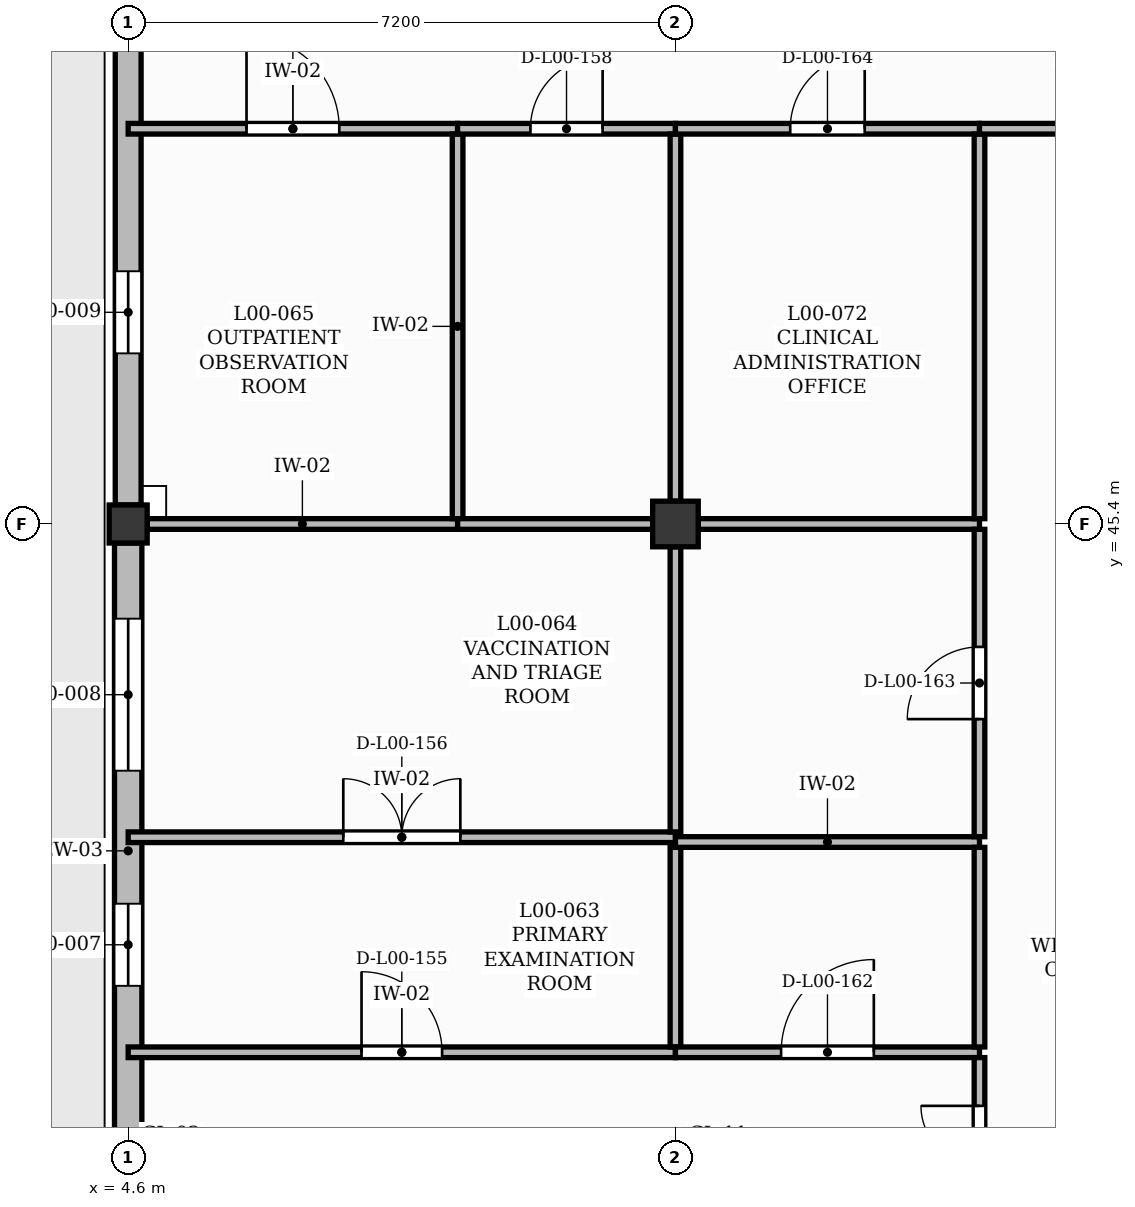
"""IFC4 building model, lengths in metres.
Left out: names, types, materials, properties, quantities, classifications, styles, units other than length and angle.
Written with IfcOpenShell. Run it as: python <this file> out.ifc"""

import sys

from ifc_helpers import new_model, si_unit, direction, frame, frame_2d, origin, origin_2d, place, context, subcontext, project, spatial, rectangle, extrude, element, fill, save


model = new_model("IFC4")
c1 = context("Model", 3, precision=1e-05, world=origin(), true_north=direction((0.0, 1.0)))
c2 = subcontext(c1, "Body", "Model", "MODEL_VIEW")
j1 = project(units=[si_unit("LENGTHUNIT", "METRE"), si_unit("PLANEANGLEUNIT", "RADIAN")], contexts=[c1])
p1 = place(None, origin())
s1 = spatial("IfcSite", under=j1, at=p1, CompositionType="ELEMENT")
p2 = place(p1, origin())
s2 = spatial("IfcBuilding", under=s1, at=p2, CompositionType="ELEMENT")
p3 = place(p2, origin())
s3 = spatial("IfcBuildingStorey", under=s2, at=p3, CompositionType="ELEMENT", Elevation=0.0)
p4 = place(p3, frame((4.6, 45.4, 0.0), z_axis=(0.0, 0.0, 1.0), x_axis=(1.0, 0.0, 0.0)))
e1 = element("IfcColumn", 1, at=p4, inside=s3, PredefinedType="COLUMN", context=c2, shape_type="SweptSolid", body=[
    extrude(rectangle(XDim=0.5, YDim=0.5, at=origin_2d()), origin(), (0.0, 0.0, 1.0), 4.2),
])
p5 = place(p3, frame((11.8, 45.4, 0.0), z_axis=(0.0, 0.0, 1.0), x_axis=(1.0, 0.0, 0.0)))
e2 = element("IfcColumn", 2, at=p5, inside=s3, PredefinedType="COLUMN", context=c2, shape_type="SweptSolid", body=[
    extrude(rectangle(XDim=0.6, YDim=0.6, at=origin_2d()), origin(), (0.0, 0.0, 1.0), 4.2),
])
p6 = place(p3, frame((4.6, 37.05, 0.0), z_axis=(0.0, 0.0, 1.0), x_axis=(0.0, 1.0, 0.0)))
e3 = element("IfcWall", 3, at=p6, inside=s3, PredefinedType="SOLIDWALL", context=c2, shape_type="SweptSolid", body=[
    extrude(rectangle(XDim=8.1, YDim=0.36, at=frame_2d((4.05, 0.0))), origin(), (0.0, 0.0, 1.0), 3.68),
])
p7 = place(p6, frame((2.274, 0.0, 1.0)))
e4 = element("IfcOpeningElement", 4, at=p7, cuts=e3, PredefinedType="OPENING", context=c2, shape_type="SweptSolid", body=[
    extrude(rectangle(XDim=1.08, YDim=1.95, at=frame_2d((0.54, 0.975))), frame((0.0, 0.19, 0.0), z_axis=(0.0, -1.0, 0.0), x_axis=(1.0, 0.0, 0.0)), (0.0, 0.0, 1.0), 0.38),
])
p8 = place(p6, frame((5.104, 0.0, 1.0)))
e5 = element("IfcOpeningElement", 5, at=p8, cuts=e3, PredefinedType="OPENING", context=c2, shape_type="SweptSolid", body=[
    extrude(rectangle(XDim=2.0, YDim=2.2, at=frame_2d((1.0, 1.1))), frame((0.0, 0.19, 0.0), z_axis=(0.0, -1.0, 0.0), x_axis=(1.0, 0.0, 0.0)), (0.0, 0.0, 1.0), 0.38),
])
p9 = place(p3, frame((4.6, 45.65, 0.0), z_axis=(0.0, 0.0, 1.0), x_axis=(0.0, 1.0, 0.0)))
e6 = element("IfcWall", 6, at=p9, inside=s3, PredefinedType="SOLIDWALL", context=c2, shape_type="SweptSolid", body=[
    extrude(rectangle(XDim=6.65, YDim=0.34, at=frame_2d((3.325, 0.0))), origin(), (0.0, 0.0, 1.0), 3.68),
])
p10 = place(p9, frame((1.995, 0.0, 1.0)))
e7 = element("IfcOpeningElement", 7, at=p10, cuts=e6, PredefinedType="OPENING", context=c2, shape_type="SweptSolid", body=[
    extrude(rectangle(XDim=1.08, YDim=1.95, at=frame_2d((0.54, 0.975))), frame((0.0, 0.18, 0.0), z_axis=(0.0, -1.0, 0.0), x_axis=(1.0, 0.0, 0.0)), (0.0, 0.0, 1.0), 0.36),
])
p11 = place(p3, frame((4.6, 38.45, 0.0), z_axis=(0.0, 0.0, 1.0), x_axis=(1.0, 0.0, 0.0)))
e8 = element("IfcWall", 8, at=p11, inside=s3, PredefinedType="PARTITIONING", context=c2, shape_type="SweptSolid", body=[
    extrude(rectangle(XDim=7.2, YDim=0.14, at=frame_2d((3.6, 0.0))), origin(), (0.0, 0.0, 1.0), 4.18),
])
p12 = place(p11, frame((3.07, 0.0, 0.0)))
e9 = element("IfcOpeningElement", 9, at=p12, cuts=e8, PredefinedType="OPENING", context=c2, shape_type="SweptSolid", body=[
    extrude(rectangle(XDim=1.06, YDim=2.15, at=frame_2d((0.53, 1.075))), frame((0.0, 0.08, 0.0), z_axis=(0.0, -1.0, 0.0), x_axis=(1.0, 0.0, 0.0)), (0.0, 0.0, 1.0), 0.16),
])
p13 = place(p3, frame((4.6, 41.279, 0.0), z_axis=(0.0, 0.0, 1.0), x_axis=(1.0, 0.0, 0.0)))
e10 = element("IfcWall", 10, at=p13, inside=s3, PredefinedType="PARTITIONING", context=c2, shape_type="SweptSolid", body=[
    extrude(rectangle(XDim=7.2, YDim=0.14, at=frame_2d((3.6, 0.0))), origin(), (0.0, 0.0, 1.0), 4.18),
])
p14 = place(p13, frame((2.83, 0.0, 0.0)))
e11 = element("IfcOpeningElement", 11, at=p14, cuts=e10, PredefinedType="OPENING", context=c2, shape_type="SweptSolid", body=[
    extrude(rectangle(XDim=1.54, YDim=2.25, at=frame_2d((0.77, 1.125))), frame((0.0, 0.08, 0.0), z_axis=(0.0, -1.0, 0.0), x_axis=(1.0, 0.0, 0.0)), (0.0, 0.0, 1.0), 0.16),
])
p15 = place(p3, frame((4.85, 45.4, 0.0), z_axis=(0.0, 0.0, 1.0), x_axis=(1.0, 0.0, 0.0)))
e12 = element("IfcWall", 12, at=p15, inside=s3, PredefinedType="PARTITIONING", context=c2, shape_type="SweptSolid", body=[
    extrude(rectangle(XDim=4.084, YDim=0.14, at=frame_2d((2.042, 0.0))), origin(), (0.0, 0.0, 1.0), 3.25),
])
p16 = place(p3, frame((4.6, 50.6, 0.0), z_axis=(0.0, 0.0, 1.0), x_axis=(1.0, 0.0, 0.0)))
e13 = element("IfcWall", 13, at=p16, inside=s3, PredefinedType="PARTITIONING", context=c2, shape_type="SweptSolid", body=[
    extrude(rectangle(XDim=4.334, YDim=0.14, at=frame_2d((2.167, 0.0))), origin(), (0.0, 0.0, 1.0), 4.18),
])
p17 = place(p16, frame((1.557, 0.0, 0.0)))
e14 = element("IfcOpeningElement", 14, at=p17, cuts=e13, PredefinedType="OPENING", context=c2, shape_type="SweptSolid", body=[
    extrude(rectangle(XDim=1.22, YDim=2.1, at=frame_2d((0.61, 1.05))), frame((0.0, 0.08, 0.0), z_axis=(0.0, -1.0, 0.0), x_axis=(1.0, 0.0, 0.0)), (0.0, 0.0, 1.0), 0.16),
])
p18 = place(p3, frame((8.934, 45.47, 0.0), z_axis=(0.0, 0.0, 1.0), x_axis=(0.0, 1.0, 0.0)))
e15 = element("IfcWall", 15, at=p18, inside=s3, PredefinedType="PARTITIONING", context=c2, shape_type="SweptSolid", body=[
    extrude(rectangle(XDim=5.06, YDim=0.14, at=frame_2d((2.53, 0.0))), origin(), (0.0, 0.0, 1.0), 4.18),
])
p19 = place(p3, frame((8.934, 45.4, 0.0), z_axis=(0.0, 0.0, 1.0), x_axis=(1.0, 0.0, 0.0)))
e16 = element("IfcWall", 16, at=p19, inside=s3, PredefinedType="PARTITIONING", context=c2, shape_type="SweptSolid", body=[
    extrude(rectangle(XDim=2.566, YDim=0.14, at=frame_2d((1.283, 0.0))), origin(), (0.0, 0.0, 1.0), 3.25),
])
p20 = place(p3, frame((8.934, 50.6, 0.0), z_axis=(0.0, 0.0, 1.0), x_axis=(1.0, 0.0, 0.0)))
e17 = element("IfcWall", 17, at=p20, inside=s3, PredefinedType="PARTITIONING", context=c2, shape_type="SweptSolid", body=[
    extrude(rectangle(XDim=2.866, YDim=0.14, at=frame_2d((1.433, 0.0))), origin(), (0.0, 0.0, 1.0), 4.18),
])
p21 = place(p20, frame((0.958, 0.0, 0.0)))
e18 = element("IfcOpeningElement", 18, at=p21, cuts=e17, PredefinedType="OPENING", context=c2, shape_type="SweptSolid", body=[
    extrude(rectangle(XDim=0.95, YDim=2.1, at=frame_2d((0.475, 1.05))), frame((0.0, 0.08, 0.0), z_axis=(0.0, -1.0, 0.0), x_axis=(1.0, 0.0, 0.0)), (0.0, 0.0, 1.0), 0.16),
])
p22 = place(p3, frame((11.8, 38.52, 0.0), z_axis=(0.0, 0.0, 1.0), x_axis=(0.0, 1.0, 0.0)))
e19 = element("IfcWall", 19, at=p22, inside=s3, PredefinedType="PARTITIONING", context=c2, shape_type="SweptSolid", body=[
    extrude(rectangle(XDim=2.626, YDim=0.14, at=frame_2d((1.313, 0.0))), origin(), (0.0, 0.0, 1.0), 3.5),
])
p23 = place(p3, frame((11.8, 38.45, 0.0), z_axis=(0.0, 0.0, 1.0), x_axis=(1.0, 0.0, 0.0)))
e20 = element("IfcWall", 20, at=p23, inside=s3, PredefinedType="PARTITIONING", context=c2, shape_type="SweptSolid", body=[
    extrude(rectangle(XDim=4.0, YDim=0.14, at=frame_2d((2.0, 0.0))), origin(), (0.0, 0.0, 1.0), 4.18),
])
p24 = place(p23, frame((1.39, 0.0, 0.0)))
e21 = element("IfcOpeningElement", 21, at=p24, cuts=e20, PredefinedType="OPENING", context=c2, shape_type="SweptSolid", body=[
    extrude(rectangle(XDim=1.22, YDim=2.1, at=frame_2d((0.61, 1.05))), frame((0.0, 0.08, 0.0), z_axis=(0.0, -1.0, 0.0), x_axis=(1.0, 0.0, 0.0)), (0.0, 0.0, 1.0), 0.16),
])
p25 = place(p3, frame((11.8, 41.216, 0.0), z_axis=(0.0, 0.0, 1.0), x_axis=(1.0, 0.0, 0.0)))
e22 = element("IfcWall", 22, at=p25, inside=s3, PredefinedType="PARTITIONING", context=c2, shape_type="SweptSolid", body=[
    extrude(rectangle(XDim=4.0, YDim=0.14, at=frame_2d((2.0, 0.0))), origin(), (0.0, 0.0, 1.0), 4.18),
])
p26 = place(p3, frame((11.8, 41.349, 0.0), z_axis=(0.0, 0.0, 1.0), x_axis=(0.0, 1.0, 0.0)))
e23 = element("IfcWall", 23, at=p26, inside=s3, PredefinedType="PARTITIONING", context=c2, shape_type="SweptSolid", body=[
    extrude(rectangle(XDim=3.751, YDim=0.14, at=frame_2d((1.875, 0.0))), origin(), (0.0, 0.0, 1.0), 3.5),
])
p27 = place(p3, frame((11.8, 45.7, 0.0), z_axis=(0.0, 0.0, 1.0), x_axis=(0.0, 1.0, 0.0)))
e24 = element("IfcWall", 24, at=p27, inside=s3, PredefinedType="PARTITIONING", context=c2, shape_type="SweptSolid", body=[
    extrude(rectangle(XDim=4.83, YDim=0.14, at=frame_2d((2.415, 0.0))), origin(), (0.0, 0.0, 1.0), 3.5),
])
p28 = place(p3, frame((12.1, 45.4, 0.0), z_axis=(0.0, 0.0, 1.0), x_axis=(1.0, 0.0, 0.0)))
e25 = element("IfcWall", 25, at=p28, inside=s3, PredefinedType="PARTITIONING", context=c2, shape_type="SweptSolid", body=[
    extrude(rectangle(XDim=3.7, YDim=0.14, at=frame_2d((1.85, 0.0))), origin(), (0.0, 0.0, 1.0), 3.25),
])
p29 = place(p3, frame((11.8, 50.6, 0.0), z_axis=(0.0, 0.0, 1.0), x_axis=(1.0, 0.0, 0.0)))
e26 = element("IfcWall", 26, at=p29, inside=s3, PredefinedType="PARTITIONING", context=c2, shape_type="SweptSolid", body=[
    extrude(rectangle(XDim=4.0, YDim=0.14, at=frame_2d((2.0, 0.0))), origin(), (0.0, 0.0, 1.0), 4.18),
])
p30 = place(p29, frame((1.51, 0.0, 0.0)))
e27 = element("IfcOpeningElement", 27, at=p30, cuts=e26, PredefinedType="OPENING", context=c2, shape_type="SweptSolid", body=[
    extrude(rectangle(XDim=0.98, YDim=2.15, at=frame_2d((0.49, 1.075))), frame((0.0, 0.08, 0.0), z_axis=(0.0, -1.0, 0.0), x_axis=(1.0, 0.0, 0.0)), (0.0, 0.0, 1.0), 0.16),
])
p31 = place(p3, frame((15.8, 35.57, 0.0), z_axis=(0.0, 0.0, 1.0), x_axis=(0.0, 1.0, 0.0)))
e28 = element("IfcWall", 28, at=p31, inside=s3, PredefinedType="PARTITIONING", context=c2, shape_type="SweptSolid", body=[
    extrude(rectangle(XDim=2.81, YDim=0.14, at=frame_2d((1.405, 0.0))), origin(), (0.0, 0.0, 1.0), 4.18),
])
p32 = place(p31, frame((0.635, 0.0, 0.0)))
e29 = element("IfcOpeningElement", 29, at=p32, cuts=e28, PredefinedType="OPENING", context=c2, shape_type="SweptSolid", body=[
    extrude(rectangle(XDim=1.54, YDim=2.25, at=frame_2d((0.77, 1.125))), frame((0.0, 0.08, 0.0), z_axis=(0.0, -1.0, 0.0), x_axis=(1.0, 0.0, 0.0)), (0.0, 0.0, 1.0), 0.16),
])
p33 = place(p3, frame((15.8, 38.52, 0.0), z_axis=(0.0, 0.0, 1.0), x_axis=(0.0, 1.0, 0.0)))
e30 = element("IfcWall", 30, at=p33, inside=s3, PredefinedType="PARTITIONING", context=c2, shape_type="SweptSolid", body=[
    extrude(rectangle(XDim=2.626, YDim=0.14, at=frame_2d((1.313, 0.0))), origin(), (0.0, 0.0, 1.0), 4.18),
])
p34 = place(p3, frame((15.8, 41.286, 0.0), z_axis=(0.0, 0.0, 1.0), x_axis=(0.0, 1.0, 0.0)))
e31 = element("IfcWall", 31, at=p34, inside=s3, PredefinedType="PARTITIONING", context=c2, shape_type="SweptSolid", body=[
    extrude(rectangle(XDim=4.044, YDim=0.14, at=frame_2d((2.022, 0.0))), origin(), (0.0, 0.0, 1.0), 4.18),
])
p35 = place(p34, frame((1.547, 0.0, 0.0)))
e32 = element("IfcOpeningElement", 32, at=p35, cuts=e31, PredefinedType="OPENING", context=c2, shape_type="SweptSolid", body=[
    extrude(rectangle(XDim=0.95, YDim=2.1, at=frame_2d((0.475, 1.05))), frame((0.0, 0.08, 0.0), z_axis=(0.0, -1.0, 0.0), x_axis=(1.0, 0.0, 0.0)), (0.0, 0.0, 1.0), 0.16),
])
p36 = place(p3, frame((15.8, 45.47, 0.0), z_axis=(0.0, 0.0, 1.0), x_axis=(0.0, 1.0, 0.0)))
e33 = element("IfcWall", 33, at=p36, inside=s3, PredefinedType="PARTITIONING", context=c2, shape_type="SweptSolid", body=[
    extrude(rectangle(XDim=5.06, YDim=0.14, at=frame_2d((2.53, 0.0))), origin(), (0.0, 0.0, 1.0), 4.18),
])
p37 = place(p3, frame((15.8, 50.6, 0.0), z_axis=(0.0, 0.0, 1.0), x_axis=(1.0, 0.0, 0.0)))
e34 = element("IfcWall", 34, at=p37, inside=s3, PredefinedType="PARTITIONING", context=c2, shape_type="SweptSolid", body=[
    extrude(rectangle(XDim=3.2, YDim=0.14, at=frame_2d((1.6, 0.0))), origin(), (0.0, 0.0, 1.0), 4.18),
])
p38 = place(p37, frame((1.14, 0.0, 0.0)))
e35 = element("IfcOpeningElement", 35, at=p38, cuts=e34, PredefinedType="OPENING", context=c2, shape_type="SweptSolid", body=[
    extrude(rectangle(XDim=0.92, YDim=2.1, at=frame_2d((0.46, 1.05))), frame((0.0, 0.08, 0.0), z_axis=(0.0, -1.0, 0.0), x_axis=(1.0, 0.0, 0.0)), (0.0, 0.0, 1.0), 0.16),
])
p39 = place(p7, origin())
e36 = element("IfcWindow", 36, at=p39, inside=s3, PartitioningType="SINGLE_PANEL", PredefinedType="WINDOW", context=c2, shape_type="SweptSolid", body=[
    extrude(rectangle(XDim=1.08, YDim=1.95, at=frame_2d((0.54, 0.975))), frame((0.0, 0.03, 0.0), z_axis=(0.0, -1.0, 0.0), x_axis=(1.0, 0.0, 0.0)), (0.0, 0.0, 1.0), 0.06),
])
fill(e4, e36)
p40 = place(p8, origin())
e37 = element("IfcWindow", 37, at=p40, inside=s3, PartitioningType="DOUBLE_PANEL_VERTICAL", PredefinedType="WINDOW", context=c2, shape_type="SweptSolid", body=[
    extrude(rectangle(XDim=2.0, YDim=2.2, at=frame_2d((1.0, 1.1))), frame((0.0, 0.03, 0.0), z_axis=(0.0, -1.0, 0.0), x_axis=(1.0, 0.0, 0.0)), (0.0, 0.0, 1.0), 0.06),
])
fill(e5, e37)
p41 = place(p10, origin())
e38 = element("IfcWindow", 38, at=p41, inside=s3, PartitioningType="SINGLE_PANEL", PredefinedType="WINDOW", context=c2, shape_type="SweptSolid", body=[
    extrude(rectangle(XDim=1.08, YDim=1.95, at=frame_2d((0.54, 0.975))), frame((0.0, 0.03, 0.0), z_axis=(0.0, -1.0, 0.0), x_axis=(1.0, 0.0, 0.0)), (0.0, 0.0, 1.0), 0.06),
])
fill(e7, e38)
p42 = place(p32, origin())
e39 = element("IfcDoor", 39, at=p42, inside=s3, OperationType="DOUBLE_DOOR_SINGLE_SWING", PredefinedType="DOOR", context=c2, shape_type="SweptSolid", body=[
    extrude(rectangle(XDim=1.54, YDim=2.25, at=frame_2d((0.77, 1.125))), frame((0.0, 0.025, 0.0), z_axis=(0.0, -1.0, 0.0), x_axis=(1.0, 0.0, 0.0)), (0.0, 0.0, 1.0), 0.05),
])
fill(e29, e39)
p43 = place(p12, origin())
e40 = element("IfcDoor", 40, at=p43, inside=s3, OperationType="SINGLE_SWING_LEFT", PredefinedType="DOOR", context=c2, shape_type="SweptSolid", body=[
    extrude(rectangle(XDim=1.06, YDim=2.15, at=frame_2d((0.53, 1.075))), frame((0.0, 0.025, 0.0), z_axis=(0.0, -1.0, 0.0), x_axis=(1.0, 0.0, 0.0)), (0.0, 0.0, 1.0), 0.05),
])
fill(e9, e40)
p44 = place(p14, origin())
e41 = element("IfcDoor", 41, at=p44, inside=s3, OperationType="DOUBLE_DOOR_SINGLE_SWING", PredefinedType="DOOR", context=c2, shape_type="SweptSolid", body=[
    extrude(rectangle(XDim=1.54, YDim=2.25, at=frame_2d((0.77, 1.125))), frame((0.0, 0.025, 0.0), z_axis=(0.0, -1.0, 0.0), x_axis=(1.0, 0.0, 0.0)), (0.0, 0.0, 1.0), 0.05),
])
fill(e11, e41)
p45 = place(p17, origin())
e42 = element("IfcDoor", 42, at=p45, inside=s3, OperationType="SINGLE_SWING_LEFT", PredefinedType="DOOR", context=c2, shape_type="SweptSolid", body=[
    extrude(rectangle(XDim=1.22, YDim=2.1, at=frame_2d((0.61, 1.05))), frame((0.0, 0.025, 0.0), z_axis=(0.0, -1.0, 0.0), x_axis=(1.0, 0.0, 0.0)), (0.0, 0.0, 1.0), 0.05),
])
fill(e14, e42)
p46 = place(p21, origin())
e43 = element("IfcDoor", 43, at=p46, inside=s3, OperationType="SINGLE_SWING_RIGHT", PredefinedType="DOOR", context=c2, shape_type="SweptSolid", body=[
    extrude(rectangle(XDim=0.95, YDim=2.1, at=frame_2d((0.475, 1.05))), frame((0.0, 0.025, 0.0), z_axis=(0.0, -1.0, 0.0), x_axis=(1.0, 0.0, 0.0)), (0.0, 0.0, 1.0), 0.05),
])
fill(e18, e43)
p47 = place(p24, origin())
e44 = element("IfcDoor", 44, at=p47, inside=s3, OperationType="SINGLE_SWING_RIGHT", PredefinedType="DOOR", context=c2, shape_type="SweptSolid", body=[
    extrude(rectangle(XDim=1.22, YDim=2.1, at=frame_2d((0.61, 1.05))), frame((0.0, 0.025, 0.0), z_axis=(0.0, -1.0, 0.0), x_axis=(1.0, 0.0, 0.0)), (0.0, 0.0, 1.0), 0.05),
])
fill(e21, e44)
p48 = place(p35, origin())
e45 = element("IfcDoor", 45, at=p48, inside=s3, OperationType="SINGLE_SWING_LEFT", PredefinedType="DOOR", context=c2, shape_type="SweptSolid", body=[
    extrude(rectangle(XDim=0.95, YDim=2.1, at=frame_2d((0.475, 1.05))), frame((0.0, 0.025, 0.0), z_axis=(0.0, -1.0, 0.0), x_axis=(1.0, 0.0, 0.0)), (0.0, 0.0, 1.0), 0.05),
])
fill(e32, e45)
p49 = place(p30, origin())
e46 = element("IfcDoor", 46, at=p49, inside=s3, OperationType="SINGLE_SWING_RIGHT", PredefinedType="DOOR", context=c2, shape_type="SweptSolid", body=[
    extrude(rectangle(XDim=0.98, YDim=2.15, at=frame_2d((0.49, 1.075))), frame((0.0, 0.025, 0.0), z_axis=(0.0, -1.0, 0.0), x_axis=(1.0, 0.0, 0.0)), (0.0, 0.0, 1.0), 0.05),
])
fill(e27, e46)
save(model, sys.argv[1])
